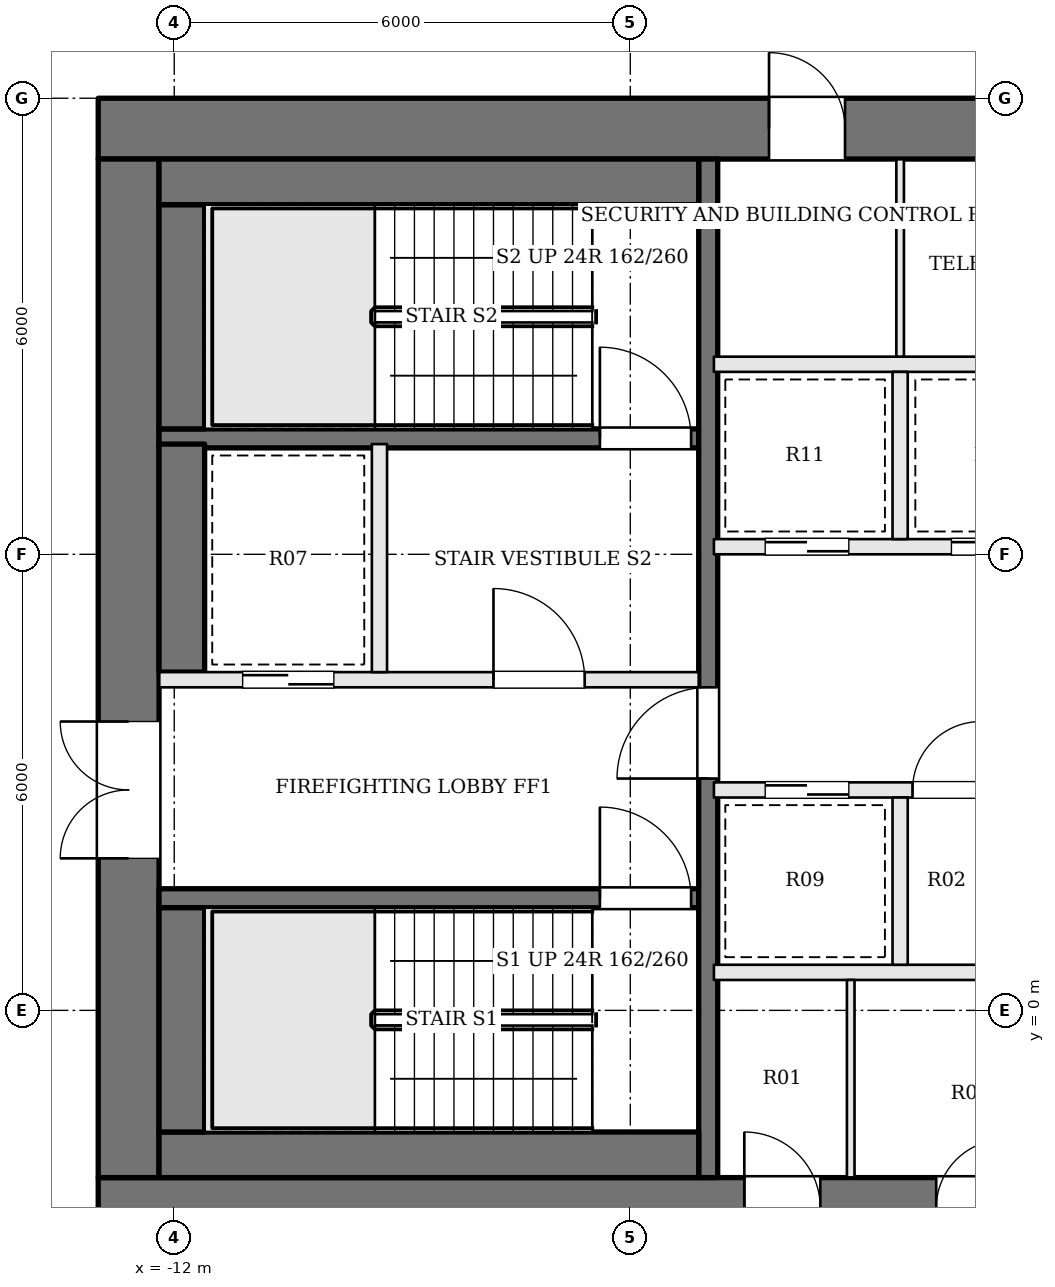
"""IFC4 building model, lengths in metres.
Left out: names, types, materials, properties, quantities, classifications, styles, units other than length and angle.
Written with IfcOpenShell. Run it as: python <this file> out.ifc"""

import sys

from ifc_helpers import new_model, si_unit, direction, frame, frame_2d, origin, place, context, subcontext, project, spatial, rectangle, extrude, element, fill, save


model = new_model("IFC4")
c1 = context("Model", 3, precision=1e-05, world=origin(), true_north=direction((0.0, 1.0)))
c2 = subcontext(c1, "Body", "Model", "MODEL_VIEW")
j1 = project(units=[si_unit("LENGTHUNIT", "METRE"), si_unit("PLANEANGLEUNIT", "RADIAN")], contexts=[c1])
p1 = place(None, origin())
s1 = spatial("IfcSite", under=j1, at=p1, CompositionType="ELEMENT")
p2 = place(p1, origin())
s2 = spatial("IfcBuilding", under=s1, at=p2, CompositionType="ELEMENT")
p3 = place(p2, frame((0.0, 0.0, 296.1)))
s3 = spatial("IfcBuildingStorey", under=s2, at=p3, CompositionType="ELEMENT", Elevation=296.1)
p4 = place(p3, frame((-13.0, 11.6, 0.0), z_axis=(0.0, 0.0, 1.0), x_axis=(1.0, 0.0, 0.0)))
e1 = element("IfcWall", 1, at=p4, inside=s3, PredefinedType="SHEAR", context=c2, shape_type="SweptSolid", body=[
    extrude(rectangle(XDim=26.0, YDim=0.8, at=frame_2d((13.0, 0.0))), origin(), (0.0, 0.0, 1.0), 3.9),
])
p5 = place(p4, frame((8.825, 0.0, 0.0)))
e2 = element("IfcOpeningElement", 2, at=p5, cuts=e1, PredefinedType="OPENING", context=c2, shape_type="SweptSolid", body=[
    extrude(rectangle(XDim=1.0, YDim=2.1, at=frame_2d((0.5, 1.05))), frame((0.0, 0.41, 0.0), z_axis=(0.0, -1.0, 0.0), x_axis=(1.0, 0.0, 0.0)), (0.0, 0.0, 1.0), 0.82),
])
p6 = place(p4, frame((11.825, 0.0, 0.0)))
e3 = element("IfcOpeningElement", 3, at=p6, cuts=e1, PredefinedType="OPENING", context=c2, shape_type="SweptSolid", body=[
    extrude(rectangle(XDim=0.7, YDim=2.1, at=frame_2d((0.35, 1.05))), frame((0.0, 0.41, 0.0), z_axis=(0.0, -1.0, 0.0), x_axis=(1.0, 0.0, 0.0)), (0.0, 0.0, 1.0), 0.82),
])
p7 = place(p4, frame((14.275, 0.0, 0.0)))
e4 = element("IfcOpeningElement", 4, at=p7, cuts=e1, PredefinedType="OPENING", context=c2, shape_type="SweptSolid", body=[
    extrude(rectangle(XDim=0.7, YDim=2.1, at=frame_2d((0.35, 1.05))), frame((0.0, 0.41, 0.0), z_axis=(0.0, -1.0, 0.0), x_axis=(1.0, 0.0, 0.0)), (0.0, 0.0, 1.0), 0.82),
])
p8 = place(p4, frame((16.175, 0.0, 0.0)))
e5 = element("IfcOpeningElement", 5, at=p8, cuts=e1, PredefinedType="OPENING", context=c2, shape_type="SweptSolid", body=[
    extrude(rectangle(XDim=1.0, YDim=2.1, at=frame_2d((0.5, 1.05))), frame((0.0, 0.41, 0.0), z_axis=(0.0, -1.0, 0.0), x_axis=(1.0, 0.0, 0.0)), (0.0, 0.0, 1.0), 0.82),
])
p9 = place(p3, frame((-13.0, -2.6, 0.0), z_axis=(0.0, 0.0, 1.0), x_axis=(1.0, 0.0, 0.0)))
e6 = element("IfcWall", 6, at=p9, inside=s3, PredefinedType="SHEAR", context=c2, shape_type="SweptSolid", body=[
    extrude(rectangle(XDim=26.0, YDim=0.8, at=frame_2d((13.0, 0.0))), origin(), (0.0, 0.0, 1.0), 3.9),
])
p10 = place(p9, frame((8.5, 0.0, 0.0)))
e7 = element("IfcOpeningElement", 7, at=p10, cuts=e6, PredefinedType="OPENING", context=c2, shape_type="SweptSolid", body=[
    extrude(rectangle(XDim=1.0, YDim=2.1, at=frame_2d((0.5, 1.05))), frame((0.0, 0.41, 0.0), z_axis=(0.0, -1.0, 0.0), x_axis=(1.0, 0.0, 0.0)), (0.0, 0.0, 1.0), 0.82),
])
p11 = place(p9, frame((11.025, 0.0, 0.0)))
e8 = element("IfcOpeningElement", 8, at=p11, cuts=e6, PredefinedType="OPENING", context=c2, shape_type="SweptSolid", body=[
    extrude(rectangle(XDim=0.9, YDim=2.1, at=frame_2d((0.45, 1.05))), frame((0.0, 0.41, 0.0), z_axis=(0.0, -1.0, 0.0), x_axis=(1.0, 0.0, 0.0)), (0.0, 0.0, 1.0), 0.82),
])
p12 = place(p9, frame((14.225, 0.0, 0.0)))
e9 = element("IfcOpeningElement", 9, at=p12, cuts=e6, PredefinedType="OPENING", context=c2, shape_type="SweptSolid", body=[
    extrude(rectangle(XDim=0.9, YDim=2.1, at=frame_2d((0.45, 1.05))), frame((0.0, 0.41, 0.0), z_axis=(0.0, -1.0, 0.0), x_axis=(1.0, 0.0, 0.0)), (0.0, 0.0, 1.0), 0.82),
])
p13 = place(p9, frame((16.6, 0.0, 0.0)))
e10 = element("IfcOpeningElement", 10, at=p13, cuts=e6, PredefinedType="OPENING", context=c2, shape_type="SweptSolid", body=[
    extrude(rectangle(XDim=1.0, YDim=2.1, at=frame_2d((0.5, 1.05))), frame((0.0, 0.41, 0.0), z_axis=(0.0, -1.0, 0.0), x_axis=(1.0, 0.0, 0.0)), (0.0, 0.0, 1.0), 0.82),
])
p14 = place(p3, frame((-12.6, -2.2, 0.0), z_axis=(0.0, 0.0, 1.0), x_axis=(0.0, 1.0, 0.0)))
e11 = element("IfcWall", 11, at=p14, inside=s3, PredefinedType="SHEAR", context=c2, shape_type="SweptSolid", body=[
    extrude(rectangle(XDim=13.4, YDim=0.8, at=frame_2d((6.7, 0.0))), origin(), (0.0, 0.0, 1.0), 3.9),
])
p15 = place(p14, frame((4.2, 0.0, 0.0)))
e12 = element("IfcOpeningElement", 12, at=p15, cuts=e11, PredefinedType="OPENING", context=c2, shape_type="SweptSolid", body=[
    extrude(rectangle(XDim=1.8, YDim=2.1, at=frame_2d((0.9, 1.05))), frame((0.0, 0.41, 0.0), z_axis=(0.0, -1.0, 0.0), x_axis=(1.0, 0.0, 0.0)), (0.0, 0.0, 1.0), 0.82),
])
p16 = place(p3, frame((-12.2, 1.475, 0.0), z_axis=(0.0, 0.0, 1.0), x_axis=(1.0, 0.0, 0.0)))
e13 = element("IfcWall", 13, at=p16, inside=s3, PredefinedType="SOLIDWALL", context=c2, shape_type="SweptSolid", body=[
    extrude(rectangle(XDim=7.1, YDim=0.25, at=frame_2d((3.55, 0.0))), origin(), (0.0, 0.0, 1.0), 3.7),
])
p17 = place(p16, frame((5.8, 0.0, 0.0)))
e14 = element("IfcOpeningElement", 14, at=p17, cuts=e13, PredefinedType="OPENING", context=c2, shape_type="SweptSolid", body=[
    extrude(rectangle(XDim=1.2, YDim=2.1, at=frame_2d((0.6, 1.05))), frame((0.0, 0.135, 0.0), z_axis=(0.0, -1.0, 0.0), x_axis=(1.0, 0.0, 0.0)), (0.0, 0.0, 1.0), 0.27),
])
p18 = place(p3, frame((-12.2, 4.35, 0.0), z_axis=(0.0, 0.0, 1.0), x_axis=(1.0, 0.0, 0.0)))
e15 = element("IfcWall", 15, at=p18, inside=s3, PredefinedType="SOLIDWALL", context=c2, shape_type="SweptSolid", body=[
    extrude(rectangle(XDim=7.1, YDim=0.2, at=frame_2d((3.55, 0.0))), origin(), (0.0, 0.0, 1.0), 3.7),
])
p19 = place(p18, frame((4.4, 0.0, 0.0)))
e16 = element("IfcOpeningElement", 16, at=p19, cuts=e15, PredefinedType="OPENING", context=c2, shape_type="SweptSolid", body=[
    extrude(rectangle(XDim=1.2, YDim=2.1, at=frame_2d((0.6, 1.05))), frame((0.0, 0.11, 0.0), z_axis=(0.0, -1.0, 0.0), x_axis=(1.0, 0.0, 0.0)), (0.0, 0.0, 1.0), 0.22),
])
p20 = place(p18, frame((1.1, 0.0, 0.0)))
e17 = element("IfcOpeningElement", 17, at=p20, cuts=e15, PredefinedType="OPENING", context=c2, shape_type="SweptSolid", body=[
    extrude(rectangle(XDim=1.2, YDim=2.1, at=frame_2d((0.6, 1.05))), frame((0.0, 0.11, 0.0), z_axis=(0.0, -1.0, 0.0), x_axis=(1.0, 0.0, 0.0)), (0.0, 0.0, 1.0), 0.22),
])
p21 = place(p3, frame((-12.2, 7.525, 0.0), z_axis=(0.0, 0.0, 1.0), x_axis=(1.0, 0.0, 0.0)))
e18 = element("IfcWall", 18, at=p21, inside=s3, PredefinedType="SOLIDWALL", context=c2, shape_type="SweptSolid", body=[
    extrude(rectangle(XDim=7.1, YDim=0.25, at=frame_2d((3.55, 0.0))), origin(), (0.0, 0.0, 1.0), 3.7),
])
p22 = place(p21, frame((5.8, 0.0, 0.0)))
e19 = element("IfcOpeningElement", 19, at=p22, cuts=e18, PredefinedType="OPENING", context=c2, shape_type="SweptSolid", body=[
    extrude(rectangle(XDim=1.2, YDim=2.1, at=frame_2d((0.6, 1.05))), frame((0.0, 0.135, 0.0), z_axis=(0.0, -1.0, 0.0), x_axis=(1.0, 0.0, 0.0)), (0.0, 0.0, 1.0), 0.27),
])
p23 = place(p3, frame((-9.3, 4.45, 0.0), z_axis=(0.0, 0.0, 1.0), x_axis=(0.0, 1.0, 0.0)))
e20 = element("IfcWall", 20, at=p23, inside=s3, PredefinedType="SOLIDWALL", context=c2, shape_type="SweptSolid", body=[
    extrude(rectangle(XDim=3.0, YDim=0.2, at=frame_2d((1.5, 0.0))), origin(), (0.0, 0.0, 1.0), 3.7),
])
p24 = place(p3, frame((-4.975, -2.2, 0.0), z_axis=(0.0, 0.0, 1.0), x_axis=(0.0, 1.0, 0.0)))
e21 = element("IfcWall", 21, at=p24, inside=s3, PredefinedType="SOLIDWALL", context=c2, shape_type="SweptSolid", body=[
    extrude(rectangle(XDim=13.4, YDim=0.25, at=frame_2d((6.7, 0.0))), origin(), (0.0, 0.0, 1.0), 3.7),
])
p25 = place(p24, frame((5.25, 0.0, 0.0)))
e22 = element("IfcOpeningElement", 22, at=p25, cuts=e21, PredefinedType="OPENING", context=c2, shape_type="SweptSolid", body=[
    extrude(rectangle(XDim=1.2, YDim=2.1, at=frame_2d((0.6, 1.05))), frame((0.0, 0.135, 0.0), z_axis=(0.0, -1.0, 0.0), x_axis=(1.0, 0.0, 0.0)), (0.0, 0.0, 1.0), 0.27),
])
p26 = place(p3, frame((-12.2, -1.9, 0.0), z_axis=(0.0, 0.0, 1.0), x_axis=(1.0, 0.0, 0.0)))
e23 = element("IfcWall", 23, at=p26, inside=s3, PredefinedType="SOLIDWALL", context=c2, shape_type="SweptSolid", body=[
    extrude(rectangle(XDim=7.1, YDim=0.6, at=frame_2d((3.55, 0.0))), origin(), (0.0, 0.0, 1.0), 3.7),
])
p27 = place(p3, frame((-11.9, -1.6, 0.0), z_axis=(0.0, 0.0, 1.0), x_axis=(0.0, 1.0, 0.0)))
e24 = element("IfcWall", 24, at=p27, inside=s3, PredefinedType="SOLIDWALL", context=c2, shape_type="SweptSolid", body=[
    extrude(rectangle(XDim=2.95, YDim=0.6, at=frame_2d((1.475, 0.0))), origin(), (0.0, 0.0, 1.0), 3.7),
])
p28 = place(p3, frame((-11.9, 4.45, 0.0), z_axis=(0.0, 0.0, 1.0), x_axis=(0.0, 1.0, 0.0)))
e25 = element("IfcWall", 25, at=p28, inside=s3, PredefinedType="SOLIDWALL", context=c2, shape_type="SweptSolid", body=[
    extrude(rectangle(XDim=3.0, YDim=0.6, at=frame_2d((1.5, 0.0))), origin(), (0.0, 0.0, 1.0), 3.7),
])
p29 = place(p3, frame((-11.9, 7.65, 0.0), z_axis=(0.0, 0.0, 1.0), x_axis=(0.0, 1.0, 0.0)))
e26 = element("IfcWall", 26, at=p29, inside=s3, PredefinedType="SOLIDWALL", context=c2, shape_type="SweptSolid", body=[
    extrude(rectangle(XDim=2.95, YDim=0.6, at=frame_2d((1.475, 0.0))), origin(), (0.0, 0.0, 1.0), 3.7),
])
p30 = place(p3, frame((-12.2, 10.9, 0.0), z_axis=(0.0, 0.0, 1.0), x_axis=(1.0, 0.0, 0.0)))
e27 = element("IfcWall", 27, at=p30, inside=s3, PredefinedType="SOLIDWALL", context=c2, shape_type="SweptSolid", body=[
    extrude(rectangle(XDim=7.1, YDim=0.6, at=frame_2d((3.55, 0.0))), origin(), (0.0, 0.0, 1.0), 3.7),
])
p31 = place(p3, frame((-4.9, 0.5, 0.0), z_axis=(0.0, 0.0, 1.0), x_axis=(1.0, 0.0, 0.0)))
e28 = element("IfcWall", 28, at=p31, inside=s3, PredefinedType="SOLIDWALL", context=c2, shape_type="SweptSolid", body=[
    extrude(rectangle(XDim=9.8, YDim=0.2, at=frame_2d((4.9, 0.0))), origin(), (0.0, 0.0, 1.0), 3.7),
])
p32 = place(p3, frame((-4.9, 2.9, 0.0), z_axis=(0.0, 0.0, 1.0), x_axis=(1.0, 0.0, 0.0)))
e29 = element("IfcWall", 29, at=p32, inside=s3, PredefinedType="SOLIDWALL", context=c2, shape_type="SweptSolid", body=[
    extrude(rectangle(XDim=9.8, YDim=0.2, at=frame_2d((4.9, 0.0))), origin(), (0.0, 0.0, 1.0), 3.7),
])
p33 = place(p32, frame((0.675, 0.0, 0.0)))
e30 = element("IfcOpeningElement", 30, at=p33, cuts=e29, PredefinedType="OPENING", context=c2, shape_type="SweptSolid", body=[
    extrude(rectangle(XDim=1.1, YDim=2.1, at=frame_2d((0.55, 1.05))), frame((0.0, 0.11, 0.0), z_axis=(0.0, -1.0, 0.0), x_axis=(1.0, 0.0, 0.0)), (0.0, 0.0, 1.0), 0.22),
])
p34 = place(p32, frame((2.613, 0.0, 0.0)))
e31 = element("IfcOpeningElement", 31, at=p34, cuts=e29, PredefinedType="OPENING", context=c2, shape_type="SweptSolid", body=[
    extrude(rectangle(XDim=0.9, YDim=2.1, at=frame_2d((0.45, 1.05))), frame((0.0, 0.11, 0.0), z_axis=(0.0, -1.0, 0.0), x_axis=(1.0, 0.0, 0.0)), (0.0, 0.0, 1.0), 0.22),
])
p35 = place(p32, frame((4.35, 0.0, 0.0)))
e32 = element("IfcOpeningElement", 32, at=p35, cuts=e29, PredefinedType="OPENING", context=c2, shape_type="SweptSolid", body=[
    extrude(rectangle(XDim=1.1, YDim=2.1, at=frame_2d((0.55, 1.05))), frame((0.0, 0.11, 0.0), z_axis=(0.0, -1.0, 0.0), x_axis=(1.0, 0.0, 0.0)), (0.0, 0.0, 1.0), 0.22),
])
p36 = place(p32, frame((7.463, 0.0, 0.0)))
e33 = element("IfcOpeningElement", 33, at=p36, cuts=e29, PredefinedType="OPENING", context=c2, shape_type="SweptSolid", body=[
    extrude(rectangle(XDim=1.0, YDim=2.1, at=frame_2d((0.5, 1.05))), frame((0.0, 0.11, 0.0), z_axis=(0.0, -1.0, 0.0), x_axis=(1.0, 0.0, 0.0)), (0.0, 0.0, 1.0), 0.22),
])
p37 = place(p3, frame((-4.9, 6.1, 0.0), z_axis=(0.0, 0.0, 1.0), x_axis=(1.0, 0.0, 0.0)))
e34 = element("IfcWall", 34, at=p37, inside=s3, PredefinedType="SOLIDWALL", context=c2, shape_type="SweptSolid", body=[
    extrude(rectangle(XDim=9.8, YDim=0.2, at=frame_2d((4.9, 0.0))), origin(), (0.0, 0.0, 1.0), 3.7),
])
p38 = place(p37, frame((0.675, 0.0, 0.0)))
e35 = element("IfcOpeningElement", 35, at=p38, cuts=e34, PredefinedType="OPENING", context=c2, shape_type="SweptSolid", body=[
    extrude(rectangle(XDim=1.1, YDim=2.1, at=frame_2d((0.55, 1.05))), frame((0.0, 0.11, 0.0), z_axis=(0.0, -1.0, 0.0), x_axis=(1.0, 0.0, 0.0)), (0.0, 0.0, 1.0), 0.22),
])
p39 = place(p37, frame((3.125, 0.0, 0.0)))
e36 = element("IfcOpeningElement", 36, at=p39, cuts=e34, PredefinedType="OPENING", context=c2, shape_type="SweptSolid", body=[
    extrude(rectangle(XDim=1.1, YDim=2.1, at=frame_2d((0.55, 1.05))), frame((0.0, 0.11, 0.0), z_axis=(0.0, -1.0, 0.0), x_axis=(1.0, 0.0, 0.0)), (0.0, 0.0, 1.0), 0.22),
])
p40 = place(p37, frame((5.575, 0.0, 0.0)))
e37 = element("IfcOpeningElement", 37, at=p40, cuts=e34, PredefinedType="OPENING", context=c2, shape_type="SweptSolid", body=[
    extrude(rectangle(XDim=1.1, YDim=2.1, at=frame_2d((0.55, 1.05))), frame((0.0, 0.11, 0.0), z_axis=(0.0, -1.0, 0.0), x_axis=(1.0, 0.0, 0.0)), (0.0, 0.0, 1.0), 0.22),
])
p41 = place(p37, frame((8.025, 0.0, 0.0)))
e38 = element("IfcOpeningElement", 38, at=p41, cuts=e34, PredefinedType="OPENING", context=c2, shape_type="SweptSolid", body=[
    extrude(rectangle(XDim=1.1, YDim=2.1, at=frame_2d((0.55, 1.05))), frame((0.0, 0.11, 0.0), z_axis=(0.0, -1.0, 0.0), x_axis=(1.0, 0.0, 0.0)), (0.0, 0.0, 1.0), 0.22),
])
p42 = place(p3, frame((-4.9, 8.5, 0.0), z_axis=(0.0, 0.0, 1.0), x_axis=(1.0, 0.0, 0.0)))
e39 = element("IfcWall", 39, at=p42, inside=s3, PredefinedType="SOLIDWALL", context=c2, shape_type="SweptSolid", body=[
    extrude(rectangle(XDim=9.8, YDim=0.2, at=frame_2d((4.9, 0.0))), origin(), (0.0, 0.0, 1.0), 3.7),
])
for number, where, z_axis, x_axis in (
    (40, (-2.45, 0.6, 0.0), (0.0, 0.0, 1.0), (0.0, 1.0, 0.0)),
    (41, (-2.45, 6.2, 0.0), (0.0, 0.0, 1.0), (0.0, 1.0, 0.0)),
):
    element("IfcWall", number, at=place(p3, frame(where, z_axis=z_axis, x_axis=x_axis)), inside=s3, PredefinedType="SOLIDWALL", context=c2, shape_type="SweptSolid", body=[
        extrude(rectangle(XDim=2.2, YDim=0.2, at=frame_2d((1.1, 0.0))), origin(), (0.0, 0.0, 1.0), 3.7),
    ])
for number, where, z_axis, x_axis in (
    (42, (-3.1, -2.2, 0.0), (0.0, 0.0, 1.0), (0.0, 1.0, 0.0)),
    (43, (-2.45, 8.6, 0.0), (0.0, 0.0, 1.0), (0.0, 1.0, 0.0)),
):
    element("IfcWall", number, at=place(p3, frame(where, z_axis=z_axis, x_axis=x_axis)), inside=s3, PredefinedType="PARTITIONING", context=c2, shape_type="SweptSolid", body=[
        extrude(rectangle(XDim=2.6, YDim=0.1, at=frame_2d((1.3, 0.0))), origin(), (0.0, 0.0, 1.0), 3.7),
    ])
p43 = place(p15, origin())
e44 = element("IfcDoor", 44, at=p43, inside=s3, OperationType="DOUBLE_DOOR_SINGLE_SWING", PredefinedType="DOOR", context=c2, shape_type="SweptSolid", body=[
    extrude(rectangle(XDim=1.8, YDim=2.1, at=frame_2d((0.9, 1.05))), frame((0.0, 0.025, 0.0), z_axis=(0.0, -1.0, 0.0), x_axis=(1.0, 0.0, 0.0)), (0.0, 0.0, 1.0), 0.05),
])
fill(e12, e44)
p44 = place(p25, origin())
e45 = element("IfcDoor", 45, at=p44, inside=s3, OperationType="SINGLE_SWING_LEFT", PredefinedType="DOOR", context=c2, shape_type="SweptSolid", body=[
    extrude(rectangle(XDim=1.2, YDim=2.1, at=frame_2d((0.6, 1.05))), frame((0.0, 0.025, 0.0), z_axis=(0.0, -1.0, 0.0), x_axis=(1.0, 0.0, 0.0)), (0.0, 0.0, 1.0), 0.05),
])
fill(e22, e45)
p45 = place(p19, origin())
e46 = element("IfcDoor", 46, at=p45, inside=s3, OperationType="SINGLE_SWING_LEFT", PredefinedType="DOOR", context=c2, shape_type="SweptSolid", body=[
    extrude(rectangle(XDim=1.2, YDim=2.1, at=frame_2d((0.6, 1.05))), frame((0.0, 0.025, 0.0), z_axis=(0.0, -1.0, 0.0), x_axis=(1.0, 0.0, 0.0)), (0.0, 0.0, 1.0), 0.05),
])
fill(e16, e46)
p46 = place(p17, origin())
e47 = element("IfcDoor", 47, at=p46, inside=s3, OperationType="SINGLE_SWING_LEFT", PredefinedType="DOOR", context=c2, shape_type="SweptSolid", body=[
    extrude(rectangle(XDim=1.2, YDim=2.1, at=frame_2d((0.6, 1.05))), frame((0.0, 0.025, 0.0), z_axis=(0.0, -1.0, 0.0), x_axis=(1.0, 0.0, 0.0)), (0.0, 0.0, 1.0), 0.05),
])
fill(e14, e47)
p47 = place(p22, origin())
e48 = element("IfcDoor", 48, at=p47, inside=s3, OperationType="SINGLE_SWING_LEFT", PredefinedType="DOOR", context=c2, shape_type="SweptSolid", body=[
    extrude(rectangle(XDim=1.2, YDim=2.1, at=frame_2d((0.6, 1.05))), frame((0.0, 0.025, 0.0), z_axis=(0.0, -1.0, 0.0), x_axis=(1.0, 0.0, 0.0)), (0.0, 0.0, 1.0), 0.05),
])
fill(e19, e48)
p48 = place(p20, origin())
e49 = element("IfcDoor", 49, at=p48, inside=s3, OperationType="SLIDING_TO_RIGHT", PredefinedType="DOOR", context=c2, shape_type="SweptSolid", body=[
    extrude(rectangle(XDim=1.2, YDim=2.1, at=frame_2d((0.6, 1.05))), frame((0.0, 0.025, 0.0), z_axis=(0.0, -1.0, 0.0), x_axis=(1.0, 0.0, 0.0)), (0.0, 0.0, 1.0), 0.05),
])
fill(e17, e49)
p49 = place(p33, origin())
e50 = element("IfcDoor", 50, at=p49, inside=s3, OperationType="SLIDING_TO_RIGHT", PredefinedType="DOOR", context=c2, shape_type="SweptSolid", body=[
    extrude(rectangle(XDim=1.1, YDim=2.1, at=frame_2d((0.55, 1.05))), frame((0.0, 0.025, 0.0), z_axis=(0.0, -1.0, 0.0), x_axis=(1.0, 0.0, 0.0)), (0.0, 0.0, 1.0), 0.05),
])
fill(e30, e50)
p50 = place(p34, origin())
e51 = element("IfcDoor", 51, at=p50, inside=s3, OperationType="SINGLE_SWING_RIGHT", PredefinedType="DOOR", context=c2, shape_type="SweptSolid", body=[
    extrude(rectangle(XDim=0.9, YDim=2.1, at=frame_2d((0.45, 1.05))), frame((0.0, 0.025, 0.0), z_axis=(0.0, -1.0, 0.0), x_axis=(1.0, 0.0, 0.0)), (0.0, 0.0, 1.0), 0.05),
])
fill(e31, e51)
p51 = place(p38, origin())
e52 = element("IfcDoor", 52, at=p51, inside=s3, OperationType="SLIDING_TO_RIGHT", PredefinedType="DOOR", context=c2, shape_type="SweptSolid", body=[
    extrude(rectangle(XDim=1.1, YDim=2.1, at=frame_2d((0.55, 1.05))), frame((0.0, 0.025, 0.0), z_axis=(0.0, -1.0, 0.0), x_axis=(1.0, 0.0, 0.0)), (0.0, 0.0, 1.0), 0.05),
])
fill(e35, e52)
p52 = place(p39, origin())
e53 = element("IfcDoor", 53, at=p52, inside=s3, OperationType="SLIDING_TO_LEFT", PredefinedType="DOOR", context=c2, shape_type="SweptSolid", body=[
    extrude(rectangle(XDim=1.1, YDim=2.1, at=frame_2d((0.55, 1.05))), frame((0.0, 0.025, 0.0), z_axis=(0.0, -1.0, 0.0), x_axis=(1.0, 0.0, 0.0)), (0.0, 0.0, 1.0), 0.05),
])
fill(e36, e53)
p53 = place(p10, origin())
e54 = element("IfcDoor", 54, at=p53, inside=s3, OperationType="SINGLE_SWING_LEFT", PredefinedType="DOOR", context=c2, shape_type="SweptSolid", body=[
    extrude(rectangle(XDim=1.0, YDim=2.1, at=frame_2d((0.5, 1.05))), frame((0.0, 0.025, 0.0), z_axis=(0.0, -1.0, 0.0), x_axis=(1.0, 0.0, 0.0)), (0.0, 0.0, 1.0), 0.05),
])
fill(e7, e54)
p54 = place(p11, origin())
e55 = element("IfcDoor", 55, at=p54, inside=s3, OperationType="SINGLE_SWING_RIGHT", PredefinedType="DOOR", context=c2, shape_type="SweptSolid", body=[
    extrude(rectangle(XDim=0.9, YDim=2.1, at=frame_2d((0.45, 1.05))), frame((0.0, 0.025, 0.0), z_axis=(0.0, -1.0, 0.0), x_axis=(1.0, 0.0, 0.0)), (0.0, 0.0, 1.0), 0.05),
])
fill(e8, e55)
p55 = place(p5, origin())
e56 = element("IfcDoor", 56, at=p55, inside=s3, OperationType="SINGLE_SWING_LEFT", PredefinedType="DOOR", context=c2, shape_type="SweptSolid", body=[
    extrude(rectangle(XDim=1.0, YDim=2.1, at=frame_2d((0.5, 1.05))), frame((0.0, 0.025, 0.0), z_axis=(0.0, -1.0, 0.0), x_axis=(1.0, 0.0, 0.0)), (0.0, 0.0, 1.0), 0.05),
])
fill(e2, e56)
save(model, sys.argv[1])
